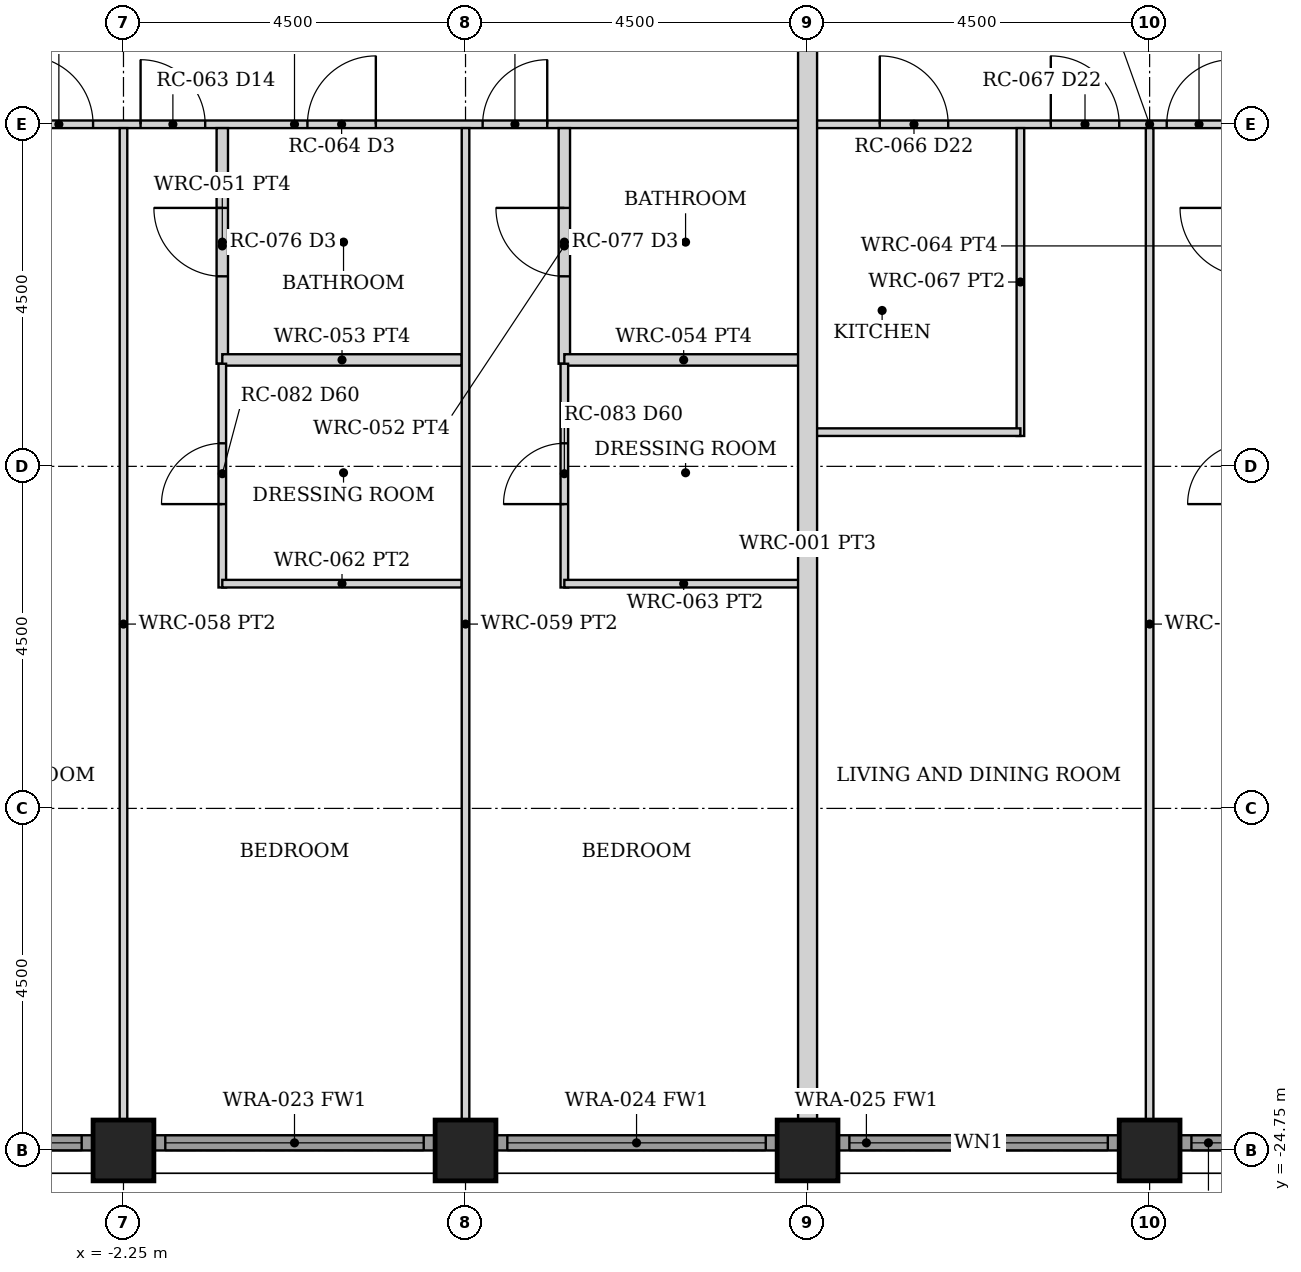
"""IFC4 building model, lengths in metres.
Left out: names, types, materials, properties, quantities, classifications, styles, units other than length and angle.
Written with IfcOpenShell. Run it as: python <this file> out.ifc"""

import sys

from ifc_helpers import new_model, si_unit, direction, frame, frame_2d, origin, origin_2d, place, context, subcontext, project, spatial, rectangle, hollow_rectangle, extrude, element, fill, save


model = new_model("IFC4")
c1 = context("Model", 3, precision=1e-05, world=origin(), true_north=direction((0.0, 1.0)))
c2 = subcontext(c1, "Body", "Model", "MODEL_VIEW")
j1 = project(units=[si_unit("LENGTHUNIT", "METRE"), si_unit("PLANEANGLEUNIT", "RADIAN")], contexts=[c1])
p1 = place(None, origin())
s1 = spatial("IfcSite", under=j1, at=p1, CompositionType="ELEMENT")
p2 = place(p1, origin())
s2 = spatial("IfcBuilding", under=s1, at=p2, CompositionType="ELEMENT")
p3 = place(p2, frame((0.0, 0.0, 47.5)))
s3 = spatial("IfcBuildingStorey", under=s2, at=p3, CompositionType="ELEMENT", Elevation=47.5)
for number, where, z_axis, x_axis in (
    (1, (-2.25, -24.75, 0.0), (0.0, 0.0, 1.0), (0.0, 1.0, 0.0)),
    (2, (2.25, -24.75, 0.0), (0.0, 0.0, 1.0), (0.0, 1.0, 0.0)),
    (3, (6.75, -24.75, 0.0), (0.0, 0.0, 1.0), (0.0, 1.0, 0.0)),
    (4, (11.25, -24.75, 0.0), (0.0, 0.0, 1.0), (0.0, 1.0, 0.0)),
):
    element("IfcColumn", number, at=place(p3, frame(where, z_axis=z_axis, x_axis=x_axis)), inside=s3, PredefinedType="COLUMN", context=c2, shape_type="SweptSolid", body=[
        extrude(hollow_rectangle(XDim=0.8, YDim=0.8, WallThickness=0.07, at=origin_2d()), origin(), (0.0, 0.0, 1.0), 3.5),
    ])
p4 = place(p3, frame((-6.345, -24.65, 0.0), z_axis=(0.0, 0.0, 1.0), x_axis=(1.0, 0.0, 0.0)))
e5 = element("IfcWall", 5, at=p4, inside=s3, PredefinedType="SOLIDWALL", context=c2, shape_type="SweptSolid", body=[
    extrude(rectangle(XDim=3.69, YDim=0.2, at=frame_2d((1.845, 0.0))), origin(), (0.0, 0.0, 1.0), 2.379),
])
p5 = place(p4, frame((0.145, 0.0, 0.3)))
e6 = element("IfcOpeningElement", 6, at=p5, cuts=e5, PredefinedType="OPENING", context=c2, shape_type="SweptSolid", body=[
    extrude(rectangle(XDim=3.4, YDim=1.929, at=frame_2d((1.7, 0.964))), frame((0.0, 0.11, 0.0), z_axis=(0.0, -1.0, 0.0), x_axis=(1.0, 0.0, 0.0)), (0.0, 0.0, 1.0), 0.22),
])
p6 = place(p3, frame((-1.845, -24.65, 0.0), z_axis=(0.0, 0.0, 1.0), x_axis=(1.0, 0.0, 0.0)))
e7 = element("IfcWall", 7, at=p6, inside=s3, PredefinedType="SOLIDWALL", context=c2, shape_type="SweptSolid", body=[
    extrude(rectangle(XDim=3.69, YDim=0.2, at=frame_2d((1.845, 0.0))), origin(), (0.0, 0.0, 1.0), 2.379),
])
p7 = place(p6, frame((0.145, 0.0, 0.3)))
e8 = element("IfcOpeningElement", 8, at=p7, cuts=e7, PredefinedType="OPENING", context=c2, shape_type="SweptSolid", body=[
    extrude(rectangle(XDim=3.4, YDim=1.929, at=frame_2d((1.7, 0.964))), frame((0.0, 0.11, 0.0), z_axis=(0.0, -1.0, 0.0), x_axis=(1.0, 0.0, 0.0)), (0.0, 0.0, 1.0), 0.22),
])
p8 = place(p3, frame((2.655, -24.65, 0.0), z_axis=(0.0, 0.0, 1.0), x_axis=(1.0, 0.0, 0.0)))
e9 = element("IfcWall", 9, at=p8, inside=s3, PredefinedType="SOLIDWALL", context=c2, shape_type="SweptSolid", body=[
    extrude(rectangle(XDim=3.69, YDim=0.2, at=frame_2d((1.845, 0.0))), origin(), (0.0, 0.0, 1.0), 2.379),
])
p9 = place(p8, frame((0.145, 0.0, 0.3)))
e10 = element("IfcOpeningElement", 10, at=p9, cuts=e9, PredefinedType="OPENING", context=c2, shape_type="SweptSolid", body=[
    extrude(rectangle(XDim=3.4, YDim=1.929, at=frame_2d((1.7, 0.964))), frame((0.0, 0.11, 0.0), z_axis=(0.0, -1.0, 0.0), x_axis=(1.0, 0.0, 0.0)), (0.0, 0.0, 1.0), 0.22),
])
p10 = place(p3, frame((7.155, -24.65, 0.0), z_axis=(0.0, 0.0, 1.0), x_axis=(1.0, 0.0, 0.0)))
e11 = element("IfcWall", 11, at=p10, inside=s3, PredefinedType="SOLIDWALL", context=c2, shape_type="SweptSolid", body=[
    extrude(rectangle(XDim=3.69, YDim=0.2, at=frame_2d((1.845, 0.0))), origin(), (0.0, 0.0, 1.0), 2.379),
])
p11 = place(p10, frame((0.145, 0.0, 0.3)))
e12 = element("IfcOpeningElement", 12, at=p11, cuts=e11, PredefinedType="OPENING", context=c2, shape_type="SweptSolid", body=[
    extrude(rectangle(XDim=3.4, YDim=1.929, at=frame_2d((1.7, 0.964))), frame((0.0, 0.11, 0.0), z_axis=(0.0, -1.0, 0.0), x_axis=(1.0, 0.0, 0.0)), (0.0, 0.0, 1.0), 0.22),
])
p12 = place(p3, frame((11.655, -24.65, 0.0), z_axis=(0.0, 0.0, 1.0), x_axis=(1.0, 0.0, 0.0)))
e13 = element("IfcWall", 13, at=p12, inside=s3, PredefinedType="SOLIDWALL", context=c2, shape_type="SweptSolid", body=[
    extrude(rectangle(XDim=3.69, YDim=0.2, at=frame_2d((1.845, 0.0))), origin(), (0.0, 0.0, 1.0), 2.379),
])
p13 = place(p12, frame((0.145, 0.0, 0.3)))
e14 = element("IfcOpeningElement", 14, at=p13, cuts=e13, PredefinedType="OPENING", context=c2, shape_type="SweptSolid", body=[
    extrude(rectangle(XDim=3.4, YDim=1.929, at=frame_2d((1.7, 0.964))), frame((0.0, 0.11, 0.0), z_axis=(0.0, -1.0, 0.0), x_axis=(1.0, 0.0, 0.0)), (0.0, 0.0, 1.0), 0.22),
])
p14 = place(p3, frame((-6.65, -11.25, 0.0), z_axis=(0.0, 0.0, 1.0), x_axis=(1.0, 0.0, 0.0)))
e15 = element("IfcWall", 15, at=p14, inside=s3, PredefinedType="PARTITIONING", context=c2, shape_type="SweptSolid", body=[
    extrude(rectangle(XDim=13.3, YDim=0.1, at=frame_2d((6.65, 0.0))), origin(), (0.0, 0.0, 1.0), 2.373),
])
p15 = place(p14, frame((0.85, 0.0, 0.0)))
e16 = element("IfcOpeningElement", 16, at=p15, cuts=e15, PredefinedType="OPENING", context=c2, shape_type="SweptSolid", body=[
    extrude(rectangle(XDim=0.9, YDim=2.1, at=frame_2d((0.45, 1.05))), frame((0.0, 0.06, 0.0), z_axis=(0.0, -1.0, 0.0), x_axis=(1.0, 0.0, 0.0)), (0.0, 0.0, 1.0), 0.12),
])
p16 = place(p14, frame((3.1, 0.0, 0.0)))
e17 = element("IfcOpeningElement", 17, at=p16, cuts=e15, PredefinedType="OPENING", context=c2, shape_type="SweptSolid", body=[
    extrude(rectangle(XDim=0.9, YDim=2.1, at=frame_2d((0.45, 1.05))), frame((0.0, 0.06, 0.0), z_axis=(0.0, -1.0, 0.0), x_axis=(1.0, 0.0, 0.0)), (0.0, 0.0, 1.0), 0.12),
])
p17 = place(p14, frame((4.625, 0.0, 0.0)))
e18 = element("IfcOpeningElement", 18, at=p17, cuts=e15, PredefinedType="OPENING", context=c2, shape_type="SweptSolid", body=[
    extrude(rectangle(XDim=0.85, YDim=2.1, at=frame_2d((0.425, 1.05))), frame((0.0, 0.06, 0.0), z_axis=(0.0, -1.0, 0.0), x_axis=(1.0, 0.0, 0.0)), (0.0, 0.0, 1.0), 0.12),
])
p18 = place(p14, frame((6.82, 0.0, 0.0)))
e19 = element("IfcOpeningElement", 19, at=p18, cuts=e15, PredefinedType="OPENING", context=c2, shape_type="SweptSolid", body=[
    extrude(rectangle(XDim=0.9, YDim=2.1, at=frame_2d((0.45, 1.05))), frame((0.0, 0.06, 0.0), z_axis=(0.0, -1.0, 0.0), x_axis=(1.0, 0.0, 0.0)), (0.0, 0.0, 1.0), 0.12),
])
p19 = place(p14, frame((9.125, 0.0, 0.0)))
e20 = element("IfcOpeningElement", 20, at=p19, cuts=e15, PredefinedType="OPENING", context=c2, shape_type="SweptSolid", body=[
    extrude(rectangle(XDim=0.85, YDim=2.1, at=frame_2d((0.425, 1.05))), frame((0.0, 0.06, 0.0), z_axis=(0.0, -1.0, 0.0), x_axis=(1.0, 0.0, 0.0)), (0.0, 0.0, 1.0), 0.12),
])
p20 = place(p3, frame((-2.25, -24.35, 0.0), z_axis=(0.0, 0.0, 1.0), x_axis=(0.0, 1.0, 0.0)))
e21 = element("IfcWall", 21, at=p20, inside=s3, PredefinedType="PARTITIONING", context=c2, shape_type="SweptSolid", body=[
    extrude(rectangle(XDim=13.05, YDim=0.1, at=frame_2d((6.525, 0.0))), origin(), (0.0, 0.0, 1.0), 2.373),
])
p21 = place(p3, frame((-0.95, -14.4, 0.0), z_axis=(0.0, 0.0, 1.0), x_axis=(0.0, 1.0, 0.0)))
e22 = element("IfcWall", 22, at=p21, inside=s3, PredefinedType="PARTITIONING", context=c2, shape_type="SweptSolid", body=[
    extrude(rectangle(XDim=3.1, YDim=0.15, at=frame_2d((1.55, 0.0))), origin(), (0.0, 0.0, 1.0), 2.373),
])
p22 = place(p21, frame((1.15, 0.0, 0.0)))
e23 = element("IfcOpeningElement", 23, at=p22, cuts=e22, PredefinedType="OPENING", context=c2, shape_type="SweptSolid", body=[
    extrude(rectangle(XDim=0.9, YDim=2.1, at=frame_2d((0.45, 1.05))), frame((0.0, 0.085, 0.0), z_axis=(0.0, -1.0, 0.0), x_axis=(1.0, 0.0, 0.0)), (0.0, 0.0, 1.0), 0.17),
])
p23 = place(p3, frame((-0.95, -14.35, 0.0), z_axis=(0.0, 0.0, 1.0), x_axis=(1.0, 0.0, 0.0)))
e24 = element("IfcWall", 24, at=p23, inside=s3, PredefinedType="PARTITIONING", context=c2, shape_type="SweptSolid", body=[
    extrude(rectangle(XDim=3.15, YDim=0.15, at=frame_2d((1.575, 0.0))), origin(), (0.0, 0.0, 1.0), 2.373),
])
p24 = place(p3, frame((-0.95, -17.344, 0.0), z_axis=(0.0, 0.0, 1.0), x_axis=(0.0, 1.0, 0.0)))
e25 = element("IfcWall", 25, at=p24, inside=s3, PredefinedType="PARTITIONING", context=c2, shape_type="SweptSolid", body=[
    extrude(rectangle(XDim=2.944, YDim=0.1, at=frame_2d((1.472, 0.0))), origin(), (0.0, 0.0, 1.0), 2.373),
])
p25 = place(p24, frame((1.097, 0.0, 0.0)))
e26 = element("IfcOpeningElement", 26, at=p25, cuts=e25, PredefinedType="OPENING", context=c2, shape_type="SweptSolid", body=[
    extrude(rectangle(XDim=0.8, YDim=2.1, at=frame_2d((0.4, 1.05))), frame((0.0, 0.06, 0.0), z_axis=(0.0, -1.0, 0.0), x_axis=(1.0, 0.0, 0.0)), (0.0, 0.0, 1.0), 0.12),
])
p26 = place(p3, frame((-0.95, -17.293, 0.0), z_axis=(0.0, 0.0, 1.0), x_axis=(1.0, 0.0, 0.0)))
e27 = element("IfcWall", 27, at=p26, inside=s3, PredefinedType="PARTITIONING", context=c2, shape_type="SweptSolid", body=[
    extrude(rectangle(XDim=3.15, YDim=0.1, at=frame_2d((1.575, 0.0))), origin(), (0.0, 0.0, 1.0), 2.373),
])
p27 = place(p3, frame((2.25, -24.35, 0.0), z_axis=(0.0, 0.0, 1.0), x_axis=(0.0, 1.0, 0.0)))
e28 = element("IfcWall", 28, at=p27, inside=s3, PredefinedType="PARTITIONING", context=c2, shape_type="SweptSolid", body=[
    extrude(rectangle(XDim=13.05, YDim=0.1, at=frame_2d((6.525, 0.0))), origin(), (0.0, 0.0, 1.0), 2.373),
])
p28 = place(p3, frame((3.55, -14.4, 0.0), z_axis=(0.0, 0.0, 1.0), x_axis=(0.0, 1.0, 0.0)))
e29 = element("IfcWall", 29, at=p28, inside=s3, PredefinedType="PARTITIONING", context=c2, shape_type="SweptSolid", body=[
    extrude(rectangle(XDim=3.1, YDim=0.15, at=frame_2d((1.55, 0.0))), origin(), (0.0, 0.0, 1.0), 2.373),
])
p29 = place(p28, frame((1.15, 0.0, 0.0)))
e30 = element("IfcOpeningElement", 30, at=p29, cuts=e29, PredefinedType="OPENING", context=c2, shape_type="SweptSolid", body=[
    extrude(rectangle(XDim=0.9, YDim=2.1, at=frame_2d((0.45, 1.05))), frame((0.0, 0.085, 0.0), z_axis=(0.0, -1.0, 0.0), x_axis=(1.0, 0.0, 0.0)), (0.0, 0.0, 1.0), 0.17),
])
p30 = place(p3, frame((3.55, -14.35, 0.0), z_axis=(0.0, 0.0, 1.0), x_axis=(1.0, 0.0, 0.0)))
e31 = element("IfcWall", 31, at=p30, inside=s3, PredefinedType="PARTITIONING", context=c2, shape_type="SweptSolid", body=[
    extrude(rectangle(XDim=3.14, YDim=0.15, at=frame_2d((1.57, 0.0))), origin(), (0.0, 0.0, 1.0), 2.373),
])
p31 = place(p3, frame((3.55, -17.344, 0.0), z_axis=(0.0, 0.0, 1.0), x_axis=(0.0, 1.0, 0.0)))
e32 = element("IfcWall", 32, at=p31, inside=s3, PredefinedType="PARTITIONING", context=c2, shape_type="SweptSolid", body=[
    extrude(rectangle(XDim=2.944, YDim=0.1, at=frame_2d((1.472, 0.0))), origin(), (0.0, 0.0, 1.0), 2.373),
])
p32 = place(p31, frame((1.097, 0.0, 0.0)))
e33 = element("IfcOpeningElement", 33, at=p32, cuts=e32, PredefinedType="OPENING", context=c2, shape_type="SweptSolid", body=[
    extrude(rectangle(XDim=0.8, YDim=2.1, at=frame_2d((0.4, 1.05))), frame((0.0, 0.06, 0.0), z_axis=(0.0, -1.0, 0.0), x_axis=(1.0, 0.0, 0.0)), (0.0, 0.0, 1.0), 0.12),
])
p33 = place(p3, frame((3.55, -17.293, 0.0), z_axis=(0.0, 0.0, 1.0), x_axis=(1.0, 0.0, 0.0)))
e34 = element("IfcWall", 34, at=p33, inside=s3, PredefinedType="PARTITIONING", context=c2, shape_type="SweptSolid", body=[
    extrude(rectangle(XDim=3.14, YDim=0.1, at=frame_2d((1.57, 0.0))), origin(), (0.0, 0.0, 1.0), 2.373),
])
p34 = place(p3, frame((6.85, -11.25, 0.0), z_axis=(0.0, 0.0, 1.0), x_axis=(1.0, 0.0, 0.0)))
e35 = element("IfcWall", 35, at=p34, inside=s3, PredefinedType="PARTITIONING", context=c2, shape_type="SweptSolid", body=[
    extrude(rectangle(XDim=8.8, YDim=0.1, at=frame_2d((4.4, 0.0))), origin(), (0.0, 0.0, 1.0), 2.373),
])
p35 = place(p34, frame((0.85, 0.0, 0.0)))
e36 = element("IfcOpeningElement", 36, at=p35, cuts=e35, PredefinedType="OPENING", context=c2, shape_type="SweptSolid", body=[
    extrude(rectangle(XDim=0.9, YDim=2.1, at=frame_2d((0.45, 1.05))), frame((0.0, 0.06, 0.0), z_axis=(0.0, -1.0, 0.0), x_axis=(1.0, 0.0, 0.0)), (0.0, 0.0, 1.0), 0.12),
])
p36 = place(p34, frame((3.1, 0.0, 0.0)))
e37 = element("IfcOpeningElement", 37, at=p36, cuts=e35, PredefinedType="OPENING", context=c2, shape_type="SweptSolid", body=[
    extrude(rectangle(XDim=0.9, YDim=2.1, at=frame_2d((0.45, 1.05))), frame((0.0, 0.06, 0.0), z_axis=(0.0, -1.0, 0.0), x_axis=(1.0, 0.0, 0.0)), (0.0, 0.0, 1.0), 0.12),
])
p37 = place(p34, frame((4.625, 0.0, 0.0)))
e38 = element("IfcOpeningElement", 38, at=p37, cuts=e35, PredefinedType="OPENING", context=c2, shape_type="SweptSolid", body=[
    extrude(rectangle(XDim=0.85, YDim=2.1, at=frame_2d((0.425, 1.05))), frame((0.0, 0.06, 0.0), z_axis=(0.0, -1.0, 0.0), x_axis=(1.0, 0.0, 0.0)), (0.0, 0.0, 1.0), 0.12),
])
p38 = place(p34, frame((6.82, 0.0, 0.0)))
e39 = element("IfcOpeningElement", 39, at=p38, cuts=e35, PredefinedType="OPENING", context=c2, shape_type="SweptSolid", body=[
    extrude(rectangle(XDim=0.9, YDim=2.1, at=frame_2d((0.45, 1.05))), frame((0.0, 0.06, 0.0), z_axis=(0.0, -1.0, 0.0), x_axis=(1.0, 0.0, 0.0)), (0.0, 0.0, 1.0), 0.12),
])
p39 = place(p3, frame((9.55, -15.35, 0.0), z_axis=(0.0, 0.0, 1.0), x_axis=(0.0, 1.0, 0.0)))
e40 = element("IfcWall", 40, at=p39, inside=s3, PredefinedType="PARTITIONING", context=c2, shape_type="SweptSolid", body=[
    extrude(rectangle(XDim=4.05, YDim=0.1, at=frame_2d((2.025, 0.0))), origin(), (0.0, 0.0, 1.0), 2.373),
])
p40 = place(p3, frame((6.81, -15.3, 0.0), z_axis=(0.0, 0.0, 1.0), x_axis=(1.0, 0.0, 0.0)))
e41 = element("IfcWall", 41, at=p40, inside=s3, PredefinedType="PARTITIONING", context=c2, shape_type="SweptSolid", body=[
    extrude(rectangle(XDim=2.74, YDim=0.1, at=frame_2d((1.37, 0.0))), origin(), (0.0, 0.0, 1.0), 2.373),
])
p41 = place(p3, frame((11.25, -24.35, 0.0), z_axis=(0.0, 0.0, 1.0), x_axis=(0.0, 1.0, 0.0)))
e42 = element("IfcWall", 42, at=p41, inside=s3, PredefinedType="PARTITIONING", context=c2, shape_type="SweptSolid", body=[
    extrude(rectangle(XDim=13.05, YDim=0.1, at=frame_2d((6.525, 0.0))), origin(), (0.0, 0.0, 1.0), 2.373),
])
p42 = place(p3, frame((6.75, -24.35, 0.0), z_axis=(0.0, 0.0, 1.0), x_axis=(0.0, 1.0, 0.0)))
e43 = element("IfcWall", 43, at=p42, inside=s3, PredefinedType="PARTITIONING", context=c2, shape_type="SweptSolid", body=[
    extrude(rectangle(XDim=15.15, YDim=0.25, at=frame_2d((7.575, 0.0))), origin(), (0.0, 0.0, 1.0), 2.373),
])
p43 = place(p5, origin())
e44 = element("IfcWindow", 44, at=p43, inside=s3, PartitioningType="SINGLE_PANEL", PredefinedType="WINDOW", context=c2, shape_type="SweptSolid", body=[
    extrude(rectangle(XDim=3.4, YDim=1.929, at=frame_2d((1.7, 0.964))), frame((0.0, 0.03, 0.0), z_axis=(0.0, -1.0, 0.0), x_axis=(1.0, 0.0, 0.0)), (0.0, 0.0, 1.0), 0.06),
])
fill(e6, e44)
p44 = place(p7, origin())
e45 = element("IfcWindow", 45, at=p44, inside=s3, PartitioningType="SINGLE_PANEL", PredefinedType="WINDOW", context=c2, shape_type="SweptSolid", body=[
    extrude(rectangle(XDim=3.4, YDim=1.929, at=frame_2d((1.7, 0.964))), frame((0.0, 0.03, 0.0), z_axis=(0.0, -1.0, 0.0), x_axis=(1.0, 0.0, 0.0)), (0.0, 0.0, 1.0), 0.06),
])
fill(e8, e45)
p45 = place(p9, origin())
e46 = element("IfcWindow", 46, at=p45, inside=s3, PartitioningType="SINGLE_PANEL", PredefinedType="WINDOW", context=c2, shape_type="SweptSolid", body=[
    extrude(rectangle(XDim=3.4, YDim=1.929, at=frame_2d((1.7, 0.964))), frame((0.0, 0.03, 0.0), z_axis=(0.0, -1.0, 0.0), x_axis=(1.0, 0.0, 0.0)), (0.0, 0.0, 1.0), 0.06),
])
fill(e10, e46)
p46 = place(p11, origin())
e47 = element("IfcWindow", 47, at=p46, inside=s3, PartitioningType="SINGLE_PANEL", PredefinedType="WINDOW", context=c2, shape_type="SweptSolid", body=[
    extrude(rectangle(XDim=3.4, YDim=1.929, at=frame_2d((1.7, 0.964))), frame((0.0, 0.03, 0.0), z_axis=(0.0, -1.0, 0.0), x_axis=(1.0, 0.0, 0.0)), (0.0, 0.0, 1.0), 0.06),
])
fill(e12, e47)
p47 = place(p13, origin())
e48 = element("IfcWindow", 48, at=p47, inside=s3, PartitioningType="SINGLE_PANEL", PredefinedType="WINDOW", context=c2, shape_type="SweptSolid", body=[
    extrude(rectangle(XDim=3.4, YDim=1.929, at=frame_2d((1.7, 0.964))), frame((0.0, 0.03, 0.0), z_axis=(0.0, -1.0, 0.0), x_axis=(1.0, 0.0, 0.0)), (0.0, 0.0, 1.0), 0.06),
])
fill(e14, e48)
p48 = place(p16, origin())
e49 = element("IfcDoor", 49, at=p48, inside=s3, OperationType="SINGLE_SWING_LEFT", PredefinedType="DOOR", context=c2, shape_type="SweptSolid", body=[
    extrude(rectangle(XDim=0.9, YDim=2.1, at=frame_2d((0.45, 1.05))), frame((0.0, 0.025, 0.0), z_axis=(0.0, -1.0, 0.0), x_axis=(1.0, 0.0, 0.0)), (0.0, 0.0, 1.0), 0.05),
])
fill(e17, e49)
p49 = place(p17, origin())
e50 = element("IfcDoor", 50, at=p49, inside=s3, OperationType="SINGLE_SWING_LEFT", PredefinedType="DOOR", context=c2, shape_type="SweptSolid", body=[
    extrude(rectangle(XDim=0.85, YDim=2.1, at=frame_2d((0.425, 1.05))), frame((0.0, 0.025, 0.0), z_axis=(0.0, -1.0, 0.0), x_axis=(1.0, 0.0, 0.0)), (0.0, 0.0, 1.0), 0.05),
])
fill(e18, e50)
p50 = place(p22, origin())
e51 = element("IfcDoor", 51, at=p50, inside=s3, OperationType="SINGLE_SWING_RIGHT", PredefinedType="DOOR", context=c2, shape_type="SweptSolid", body=[
    extrude(rectangle(XDim=0.9, YDim=2.1, at=frame_2d((0.45, 1.05))), frame((0.0, 0.025, 0.0), z_axis=(0.0, -1.0, 0.0), x_axis=(1.0, 0.0, 0.0)), (0.0, 0.0, 1.0), 0.05),
])
fill(e23, e51)
p51 = place(p18, origin())
e52 = element("IfcDoor", 52, at=p51, inside=s3, OperationType="SINGLE_SWING_RIGHT", PredefinedType="DOOR", context=c2, shape_type="SweptSolid", body=[
    extrude(rectangle(XDim=0.9, YDim=2.1, at=frame_2d((0.45, 1.05))), frame((0.0, 0.025, 0.0), z_axis=(0.0, -1.0, 0.0), x_axis=(1.0, 0.0, 0.0)), (0.0, 0.0, 1.0), 0.05),
])
fill(e19, e52)
p52 = place(p25, origin())
e53 = element("IfcDoor", 53, at=p52, inside=s3, OperationType="SINGLE_SWING_LEFT", PredefinedType="DOOR", context=c2, shape_type="SweptSolid", body=[
    extrude(rectangle(XDim=0.8, YDim=2.1, at=frame_2d((0.4, 1.05))), frame((0.0, 0.025, 0.0), z_axis=(0.0, -1.0, 0.0), x_axis=(1.0, 0.0, 0.0)), (0.0, 0.0, 1.0), 0.05),
])
fill(e26, e53)
p53 = place(p19, origin())
e54 = element("IfcDoor", 54, at=p53, inside=s3, OperationType="SINGLE_SWING_RIGHT", PredefinedType="DOOR", context=c2, shape_type="SweptSolid", body=[
    extrude(rectangle(XDim=0.85, YDim=2.1, at=frame_2d((0.425, 1.05))), frame((0.0, 0.025, 0.0), z_axis=(0.0, -1.0, 0.0), x_axis=(1.0, 0.0, 0.0)), (0.0, 0.0, 1.0), 0.05),
])
fill(e20, e54)
p54 = place(p29, origin())
e55 = element("IfcDoor", 55, at=p54, inside=s3, OperationType="SINGLE_SWING_RIGHT", PredefinedType="DOOR", context=c2, shape_type="SweptSolid", body=[
    extrude(rectangle(XDim=0.9, YDim=2.1, at=frame_2d((0.45, 1.05))), frame((0.0, 0.025, 0.0), z_axis=(0.0, -1.0, 0.0), x_axis=(1.0, 0.0, 0.0)), (0.0, 0.0, 1.0), 0.05),
])
fill(e30, e55)
p55 = place(p32, origin())
e56 = element("IfcDoor", 56, at=p55, inside=s3, OperationType="SINGLE_SWING_LEFT", PredefinedType="DOOR", context=c2, shape_type="SweptSolid", body=[
    extrude(rectangle(XDim=0.8, YDim=2.1, at=frame_2d((0.4, 1.05))), frame((0.0, 0.025, 0.0), z_axis=(0.0, -1.0, 0.0), x_axis=(1.0, 0.0, 0.0)), (0.0, 0.0, 1.0), 0.05),
])
fill(e33, e56)
p56 = place(p35, origin())
e57 = element("IfcDoor", 57, at=p56, inside=s3, OperationType="SINGLE_SWING_LEFT", PredefinedType="DOOR", context=c2, shape_type="SweptSolid", body=[
    extrude(rectangle(XDim=0.9, YDim=2.1, at=frame_2d((0.45, 1.05))), frame((0.0, 0.025, 0.0), z_axis=(0.0, -1.0, 0.0), x_axis=(1.0, 0.0, 0.0)), (0.0, 0.0, 1.0), 0.05),
])
fill(e36, e57)
p57 = place(p36, origin())
e58 = element("IfcDoor", 58, at=p57, inside=s3, OperationType="SINGLE_SWING_LEFT", PredefinedType="DOOR", context=c2, shape_type="SweptSolid", body=[
    extrude(rectangle(XDim=0.9, YDim=2.1, at=frame_2d((0.45, 1.05))), frame((0.0, 0.025, 0.0), z_axis=(0.0, -1.0, 0.0), x_axis=(1.0, 0.0, 0.0)), (0.0, 0.0, 1.0), 0.05),
])
fill(e37, e58)
p58 = place(p37, origin())
e59 = element("IfcDoor", 59, at=p58, inside=s3, OperationType="SINGLE_SWING_RIGHT", PredefinedType="DOOR", context=c2, shape_type="SweptSolid", body=[
    extrude(rectangle(XDim=0.85, YDim=2.1, at=frame_2d((0.425, 1.05))), frame((0.0, 0.025, 0.0), z_axis=(0.0, -1.0, 0.0), x_axis=(1.0, 0.0, 0.0)), (0.0, 0.0, 1.0), 0.05),
])
fill(e38, e59)
save(model, sys.argv[1])
